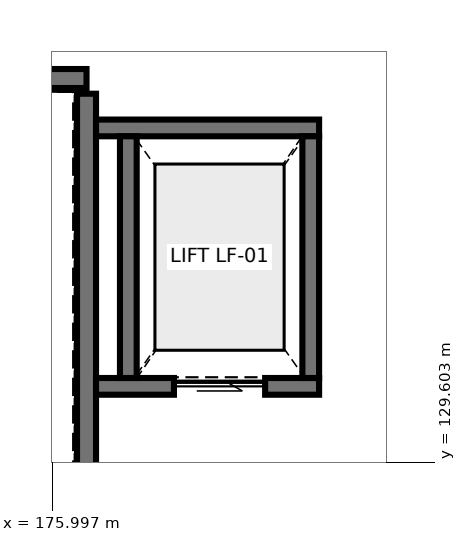
"""IFC4 building model, lengths in metres.
Left out: names, types, materials, properties, quantities, classifications, styles, units other than length and angle.
Written with IfcOpenShell. Run it as: python <this file> out.ifc"""

import sys

from ifc_helpers import new_model, si_unit, direction, frame, frame_2d, origin, place, context, subcontext, project, spatial, rectangle, extrude, element, fill, save


model = new_model("IFC4")
c1 = context("Model", 3, precision=1e-05, world=origin(), true_north=direction((0.0, 1.0)))
c2 = subcontext(c1, "Body", "Model", "MODEL_VIEW")
j1 = project(units=[si_unit("LENGTHUNIT", "METRE"), si_unit("PLANEANGLEUNIT", "RADIAN")], contexts=[c1])
p1 = place(None, origin())
s1 = spatial("IfcSite", under=j1, at=p1, CompositionType="ELEMENT")
p2 = place(p1, origin())
s2 = spatial("IfcBuilding", under=s1, at=p2, CompositionType="ELEMENT")
p3 = place(p2, frame((0.0, 0.0, 15.0)))
s3 = spatial("IfcBuildingStorey", under=s2, at=p3, CompositionType="ELEMENT", Elevation=15.0)
p4 = place(p3, frame((168.15, 134.65, 0.0), z_axis=(0.0, 0.0, 1.0), x_axis=(1.0, 0.0, 0.0)))
e1 = element("IfcWall", 1, at=p4, inside=s3, PredefinedType="SHEAR", context=c2, shape_type="SweptSolid", body=[
    extrude(rectangle(XDim=8.3, YDim=0.25, at=frame_2d((4.15, 0.0))), origin(), (0.0, 0.0, 1.0), 4.21),
])
p5 = place(p3, frame((176.45, 134.45, 0.0), z_axis=(0.0, 0.0, 1.0), x_axis=(0.0, -1.0, 0.0)))
e2 = element("IfcWall", 2, at=p5, inside=s3, PredefinedType="SHEAR", context=c2, shape_type="SweptSolid", body=[
    extrude(rectangle(XDim=5.3, YDim=0.25, at=frame_2d((2.65, 0.0))), origin(), (0.0, 0.0, 1.0), 4.21),
])
p6 = place(p3, frame((176.575, 130.6, 0.0), z_axis=(0.0, 0.0, 1.0), x_axis=(1.0, 0.0, 0.0)))
e3 = element("IfcWall", 3, at=p6, inside=s3, PredefinedType="SHEAR", context=c2, shape_type="SweptSolid", body=[
    extrude(rectangle(XDim=2.935, YDim=0.22, at=frame_2d((1.468, 0.0))), origin(), (0.0, 0.0, 1.0), 4.21),
])
p7 = place(p6, frame((1.025, 0.0, 0.0)))
e4 = element("IfcOpeningElement", 4, at=p7, cuts=e3, PredefinedType="OPENING", context=c2, shape_type="SweptSolid", body=[
    extrude(rectangle(XDim=1.2, YDim=2.25, at=frame_2d((0.6, 1.125))), frame((0.0, 0.12, 0.0), z_axis=(0.0, -1.0, 0.0), x_axis=(1.0, 0.0, 0.0)), (0.0, 0.0, 1.0), 0.24),
])
p8 = place(p3, frame((176.575, 134.0, 0.0), z_axis=(0.0, 0.0, 1.0), x_axis=(1.0, 0.0, 0.0)))
e5 = element("IfcWall", 5, at=p8, inside=s3, PredefinedType="SHEAR", context=c2, shape_type="SweptSolid", body=[
    extrude(rectangle(XDim=2.935, YDim=0.22, at=frame_2d((1.468, 0.0))), origin(), (0.0, 0.0, 1.0), 4.21),
])
for number, where, z_axis, x_axis in (
    (6, (177.0, 130.71, 0.0), (0.0, 0.0, 1.0), (0.0, 1.0, 0.0)),
    (7, (179.4, 130.71, 0.0), (0.0, 0.0, 1.0), (0.0, 1.0, 0.0)),
):
    element("IfcWall", number, at=place(p3, frame(where, z_axis=z_axis, x_axis=x_axis)), inside=s3, PredefinedType="SHEAR", context=c2, shape_type="SweptSolid", body=[
        extrude(rectangle(XDim=3.18, YDim=0.22, at=frame_2d((1.59, 0.0))), origin(), (0.0, 0.0, 1.0), 4.21),
    ])
p9 = place(p7, origin())
e8 = element("IfcDoor", 8, at=p9, inside=s3, OperationType="SLIDING_TO_LEFT", PredefinedType="DOOR", context=c2, shape_type="SweptSolid", body=[
    extrude(rectangle(XDim=1.2, YDim=2.25, at=frame_2d((0.6, 1.125))), frame((0.0, 0.025, 0.0), z_axis=(0.0, -1.0, 0.0), x_axis=(1.0, 0.0, 0.0)), (0.0, 0.0, 1.0), 0.05),
])
fill(e4, e8)
save(model, sys.argv[1])
